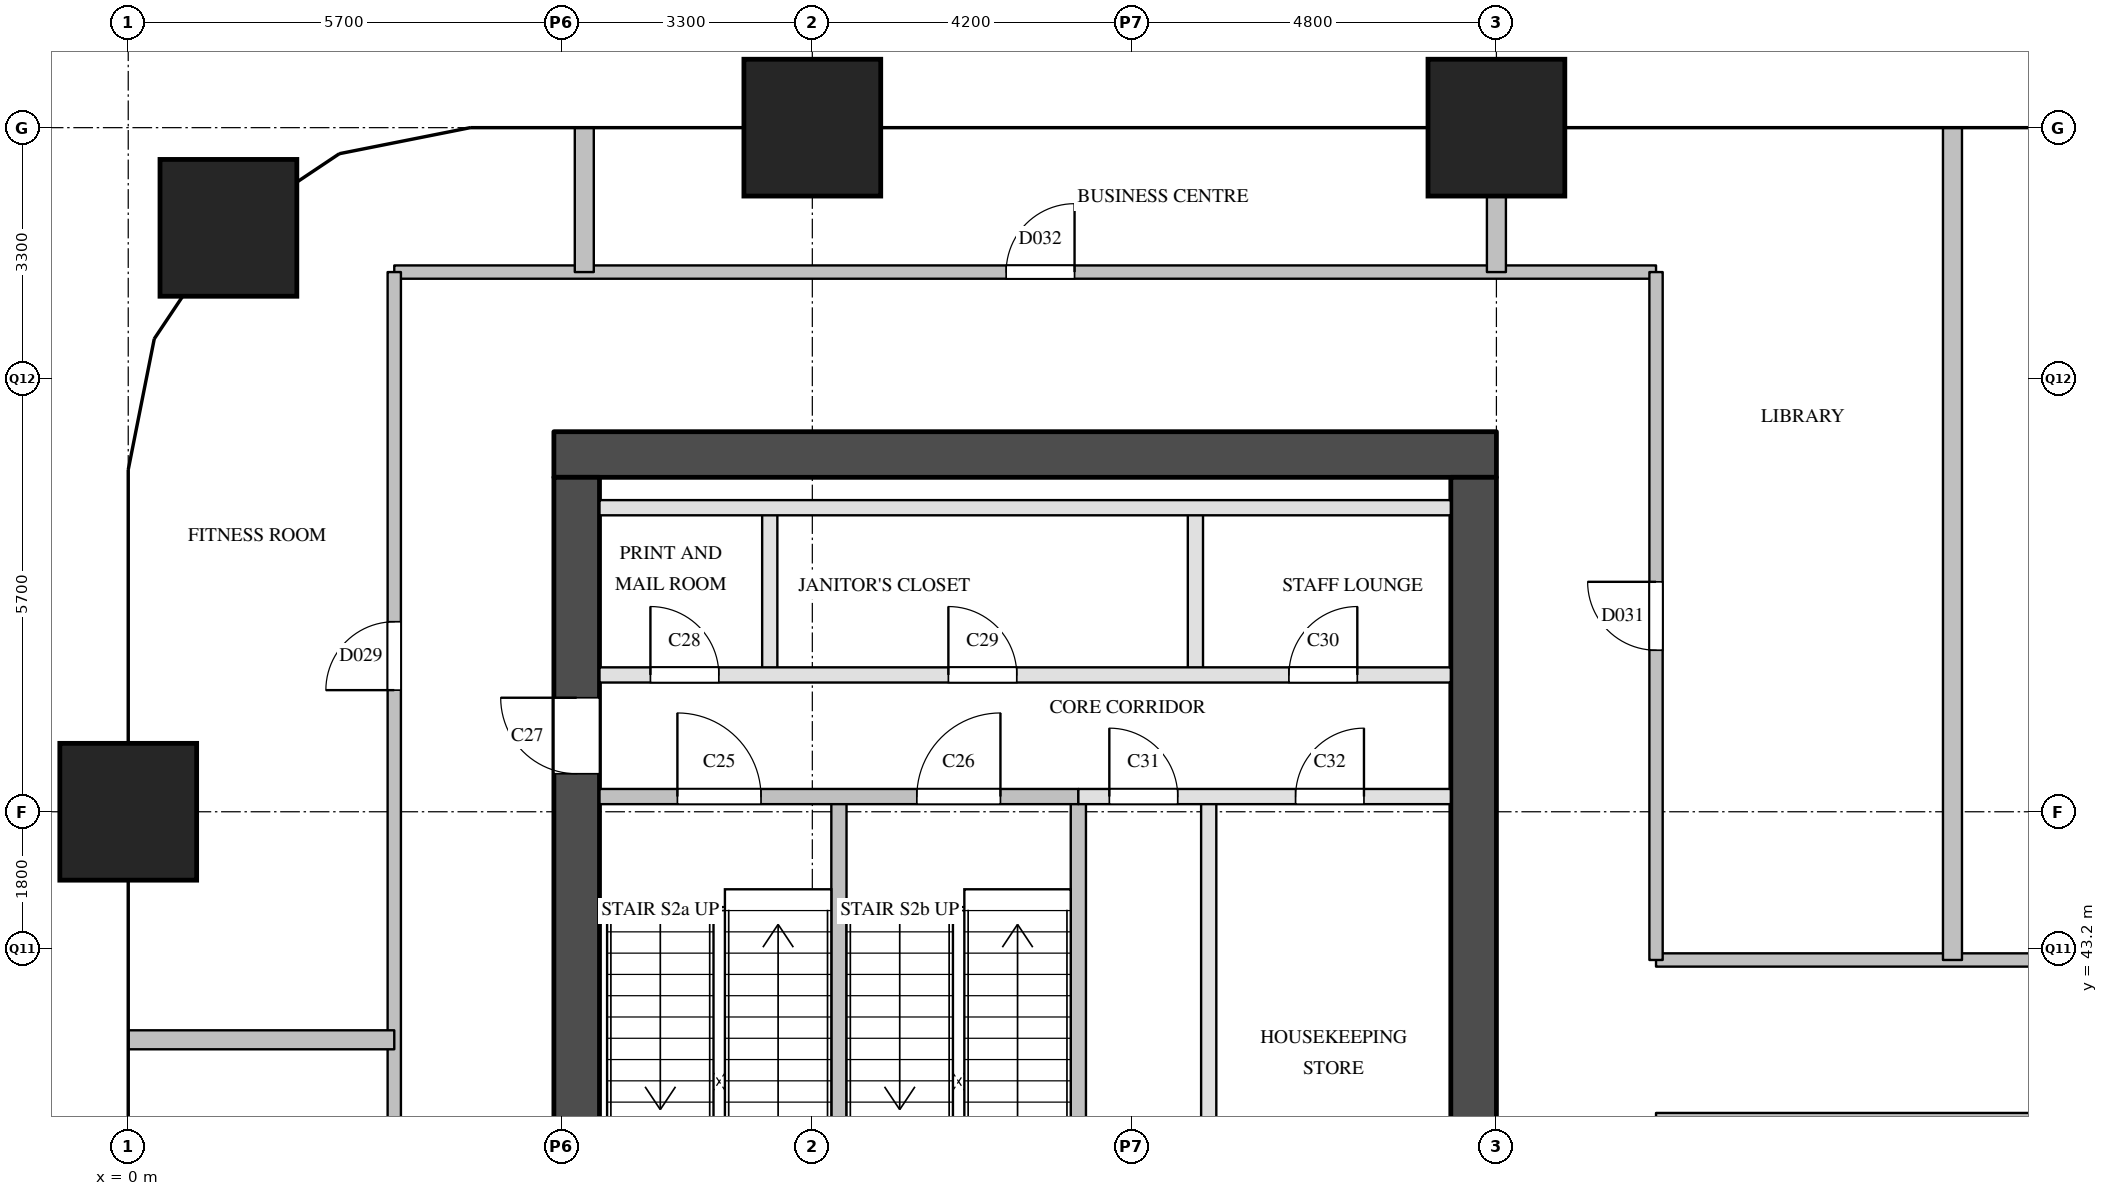
"""IFC4 building model, lengths in metres.
Left out: names, types, materials, properties, quantities, classifications, styles, units other than length and angle.
Written with IfcOpenShell. Run it as: python <this file> out.ifc"""

import sys

from ifc_helpers import new_model, si_unit, direction, frame, frame_2d, origin, origin_2d, place, context, subcontext, project, spatial, rectangle, extrude, element, fill, save


model = new_model("IFC4")
c1 = context("Model", 3, precision=1e-05, world=origin(), true_north=direction((0.0, 1.0)))
c2 = subcontext(c1, "Body", "Model", "MODEL_VIEW")
j1 = project(units=[si_unit("LENGTHUNIT", "METRE"), si_unit("PLANEANGLEUNIT", "RADIAN")], contexts=[c1])
p1 = place(None, origin())
s1 = spatial("IfcSite", under=j1, at=p1, CompositionType="ELEMENT")
p2 = place(p1, origin())
s2 = spatial("IfcBuilding", under=s1, at=p2, CompositionType="ELEMENT")
p3 = place(p2, frame((0.0, 0.0, 46.2)))
s3 = spatial("IfcBuildingStorey", under=s2, at=p3, CompositionType="ELEMENT", Elevation=46.2)
for number, where, z_axis, x_axis in (
    (1, (0.0, 45.0, 0.0), (0.0, 0.0, 1.0), (1.0, 0.0, 0.0)),
    (2, (1.318, 52.682, 0.0), (0.0, 0.0, 1.0), (1.0, 0.0, 0.0)),
    (3, (9.0, 54.0, 0.0), (0.0, 0.0, 1.0), (1.0, 0.0, 0.0)),
    (4, (18.0, 54.0, 0.0), (0.0, 0.0, 1.0), (1.0, 0.0, 0.0)),
):
    element("IfcColumn", number, at=place(p3, frame(where, z_axis=z_axis, x_axis=x_axis)), inside=s3, PredefinedType="COLUMN", context=c2, shape_type="SweptSolid", body=[
        extrude(rectangle(XDim=1.8, YDim=1.8, at=origin_2d()), origin(), (0.0, 0.0, 1.0), 3.8),
    ])
p4 = place(p3, frame((5.6, 49.7, 0.0), z_axis=(0.0, 0.0, 1.0), x_axis=(1.0, 0.0, 0.0)))
e5 = element("IfcWall", 5, at=p4, inside=s3, PredefinedType="SHEAR", context=c2, shape_type="SweptSolid", body=[
    extrude(rectangle(XDim=12.4, YDim=0.6, at=frame_2d((6.2, 0.0))), origin(), (0.0, 0.0, 1.0), 3.5),
])
p5 = place(p3, frame((5.9, 29.1, 0.0), z_axis=(0.0, 0.0, 1.0), x_axis=(0.0, 1.0, 0.0)))
e6 = element("IfcWall", 6, at=p5, inside=s3, PredefinedType="SHEAR", context=c2, shape_type="SweptSolid", body=[
    extrude(rectangle(XDim=20.3, YDim=0.6, at=frame_2d((10.15, 0.0))), origin(), (0.0, 0.0, 1.0), 3.5),
])
p6 = place(p5, frame((3.6, 0.0, 0.0)))
e7 = element("IfcOpeningElement", 7, at=p6, cuts=e6, PredefinedType="OPENING", context=c2, shape_type="SweptSolid", body=[
    extrude(rectangle(XDim=1.8, YDim=2.1, at=frame_2d((0.9, 1.05))), frame((0.0, 0.31, 0.0), z_axis=(0.0, -1.0, 0.0), x_axis=(1.0, 0.0, 0.0)), (0.0, 0.0, 1.0), 0.62),
])
p7 = place(p5, frame((16.4, 0.0, 0.0)))
e8 = element("IfcOpeningElement", 8, at=p7, cuts=e6, PredefinedType="OPENING", context=c2, shape_type="SweptSolid", body=[
    extrude(rectangle(XDim=1.0, YDim=2.1, at=frame_2d((0.5, 1.05))), frame((0.0, 0.31, 0.0), z_axis=(0.0, -1.0, 0.0), x_axis=(1.0, 0.0, 0.0)), (0.0, 0.0, 1.0), 0.62),
])
p8 = place(p3, frame((17.7, 29.1, 0.0), z_axis=(0.0, 0.0, 1.0), x_axis=(0.0, 1.0, 0.0)))
e9 = element("IfcWall", 9, at=p8, inside=s3, PredefinedType="SHEAR", context=c2, shape_type="SweptSolid", body=[
    extrude(rectangle(XDim=20.3, YDim=0.6, at=frame_2d((10.15, 0.0))), origin(), (0.0, 0.0, 1.0), 3.5),
])
p9 = place(p8, frame((1.25, 0.0, 0.0)))
e10 = element("IfcOpeningElement", 10, at=p9, cuts=e9, PredefinedType="OPENING", context=c2, shape_type="SweptSolid", body=[
    extrude(rectangle(XDim=0.7, YDim=2.1, at=frame_2d((0.35, 1.05))), frame((0.0, 0.31, 0.0), z_axis=(0.0, -1.0, 0.0), x_axis=(1.0, 0.0, 0.0)), (0.0, 0.0, 1.0), 0.62),
])
p10 = place(p8, frame((7.05, 0.0, 0.0)))
e11 = element("IfcOpeningElement", 11, at=p10, cuts=e9, PredefinedType="OPENING", context=c2, shape_type="SweptSolid", body=[
    extrude(rectangle(XDim=0.7, YDim=2.1, at=frame_2d((0.35, 1.05))), frame((0.0, 0.31, 0.0), z_axis=(0.0, -1.0, 0.0), x_axis=(1.0, 0.0, 0.0)), (0.0, 0.0, 1.0), 0.62),
])
p11 = place(p3, frame((8.44, 46.8, 0.0), z_axis=(0.0, 0.0, 1.0), x_axis=(0.0, 1.0, 0.0)))
e12 = element("IfcWall", 12, at=p11, inside=s3, PredefinedType="PARTITIONING", context=c2, shape_type="SweptSolid", body=[
    extrude(rectangle(XDim=2.2, YDim=0.2, at=frame_2d((1.1, 0.0))), origin(), (0.0, 0.0, 1.0), 3.5),
])
for number, where, z_axis, x_axis in (
    (13, (9.35, 40.9, 0.0), (0.0, 0.0, 1.0), (0.0, 1.0, 0.0)),
    (14, (12.5, 40.9, 0.0), (0.0, 0.0, 1.0), (0.0, 1.0, 0.0)),
):
    element("IfcWall", number, at=place(p3, frame(where, z_axis=z_axis, x_axis=x_axis)), inside=s3, PredefinedType="SOLIDWALL", context=c2, shape_type="SweptSolid", body=[
        extrude(rectangle(XDim=4.3, YDim=0.2, at=frame_2d((2.15, 0.0))), origin(), (0.0, 0.0, 1.0), 3.5),
    ])
p12 = place(p3, frame((14.04, 46.8, 0.0), z_axis=(0.0, 0.0, 1.0), x_axis=(0.0, 1.0, 0.0)))
e15 = element("IfcWall", 15, at=p12, inside=s3, PredefinedType="PARTITIONING", context=c2, shape_type="SweptSolid", body=[
    extrude(rectangle(XDim=2.2, YDim=0.2, at=frame_2d((1.1, 0.0))), origin(), (0.0, 0.0, 1.0), 3.5),
])
p13 = place(p3, frame((14.215, 39.0, 0.0), z_axis=(0.0, 0.0, 1.0), x_axis=(0.0, 1.0, 0.0)))
e16 = element("IfcWall", 16, at=p13, inside=s3, PredefinedType="PARTITIONING", context=c2, shape_type="SweptSolid", body=[
    extrude(rectangle(XDim=6.2, YDim=0.2, at=frame_2d((3.1, 0.0))), origin(), (0.0, 0.0, 1.0), 3.5),
])
p14 = place(p3, frame((12.5, 45.2, 0.0), z_axis=(0.0, 0.0, 1.0), x_axis=(1.0, 0.0, 0.0)))
e17 = element("IfcWall", 17, at=p14, inside=s3, PredefinedType="PARTITIONING", context=c2, shape_type="SweptSolid", body=[
    extrude(rectangle(XDim=4.9, YDim=0.2, at=frame_2d((2.45, 0.0))), origin(), (0.0, 0.0, 1.0), 3.5),
])
p15 = place(p14, frame((0.407, 0.0, 0.0)))
e18 = element("IfcOpeningElement", 18, at=p15, cuts=e17, PredefinedType="OPENING", context=c2, shape_type="SweptSolid", body=[
    extrude(rectangle(XDim=0.9, YDim=2.1, at=frame_2d((0.45, 1.05))), frame((0.0, 0.11, 0.0), z_axis=(0.0, -1.0, 0.0), x_axis=(1.0, 0.0, 0.0)), (0.0, 0.0, 1.0), 0.22),
])
p16 = place(p14, frame((2.857, 0.0, 0.0)))
e19 = element("IfcOpeningElement", 19, at=p16, cuts=e17, PredefinedType="OPENING", context=c2, shape_type="SweptSolid", body=[
    extrude(rectangle(XDim=0.9, YDim=2.1, at=frame_2d((0.45, 1.05))), frame((0.0, 0.11, 0.0), z_axis=(0.0, -1.0, 0.0), x_axis=(1.0, 0.0, 0.0)), (0.0, 0.0, 1.0), 0.22),
])
p17 = place(p3, frame((6.2, 45.2, 0.0), z_axis=(0.0, 0.0, 1.0), x_axis=(1.0, 0.0, 0.0)))
e20 = element("IfcWall", 20, at=p17, inside=s3, PredefinedType="SOLIDWALL", context=c2, shape_type="SweptSolid", body=[
    extrude(rectangle(XDim=6.3, YDim=0.2, at=frame_2d((3.15, 0.0))), origin(), (0.0, 0.0, 1.0), 3.5),
])
p18 = place(p17, frame((1.025, 0.0, 0.0)))
e21 = element("IfcOpeningElement", 21, at=p18, cuts=e20, PredefinedType="OPENING", context=c2, shape_type="SweptSolid", body=[
    extrude(rectangle(XDim=1.1, YDim=2.1, at=frame_2d((0.55, 1.05))), frame((0.0, 0.11, 0.0), z_axis=(0.0, -1.0, 0.0), x_axis=(1.0, 0.0, 0.0)), (0.0, 0.0, 1.0), 0.22),
])
p19 = place(p17, frame((4.175, 0.0, 0.0)))
e22 = element("IfcOpeningElement", 22, at=p19, cuts=e20, PredefinedType="OPENING", context=c2, shape_type="SweptSolid", body=[
    extrude(rectangle(XDim=1.1, YDim=2.1, at=frame_2d((0.55, 1.05))), frame((0.0, 0.11, 0.0), z_axis=(0.0, -1.0, 0.0), x_axis=(1.0, 0.0, 0.0)), (0.0, 0.0, 1.0), 0.22),
])
p20 = place(p3, frame((6.2, 46.8, 0.0), z_axis=(0.0, 0.0, 1.0), x_axis=(1.0, 0.0, 0.0)))
e23 = element("IfcWall", 23, at=p20, inside=s3, PredefinedType="PARTITIONING", context=c2, shape_type="SweptSolid", body=[
    extrude(rectangle(XDim=11.2, YDim=0.2, at=frame_2d((5.6, 0.0))), origin(), (0.0, 0.0, 1.0), 3.5),
])
p21 = place(p20, frame((0.67, 0.0, 0.0)))
e24 = element("IfcOpeningElement", 24, at=p21, cuts=e23, PredefinedType="OPENING", context=c2, shape_type="SweptSolid", body=[
    extrude(rectangle(XDim=0.9, YDim=2.1, at=frame_2d((0.45, 1.05))), frame((0.0, 0.11, 0.0), z_axis=(0.0, -1.0, 0.0), x_axis=(1.0, 0.0, 0.0)), (0.0, 0.0, 1.0), 0.22),
])
p22 = place(p20, frame((4.59, 0.0, 0.0)))
e25 = element("IfcOpeningElement", 25, at=p22, cuts=e23, PredefinedType="OPENING", context=c2, shape_type="SweptSolid", body=[
    extrude(rectangle(XDim=0.9, YDim=2.1, at=frame_2d((0.45, 1.05))), frame((0.0, 0.11, 0.0), z_axis=(0.0, -1.0, 0.0), x_axis=(1.0, 0.0, 0.0)), (0.0, 0.0, 1.0), 0.22),
])
p23 = place(p20, frame((9.07, 0.0, 0.0)))
e26 = element("IfcOpeningElement", 26, at=p23, cuts=e23, PredefinedType="OPENING", context=c2, shape_type="SweptSolid", body=[
    extrude(rectangle(XDim=0.9, YDim=2.1, at=frame_2d((0.45, 1.05))), frame((0.0, 0.11, 0.0), z_axis=(0.0, -1.0, 0.0), x_axis=(1.0, 0.0, 0.0)), (0.0, 0.0, 1.0), 0.22),
])
p24 = place(p3, frame((6.2, 49.0, 0.0), z_axis=(0.0, 0.0, 1.0), x_axis=(1.0, 0.0, 0.0)))
e27 = element("IfcWall", 27, at=p24, inside=s3, PredefinedType="PARTITIONING", context=c2, shape_type="SweptSolid", body=[
    extrude(rectangle(XDim=11.2, YDim=0.2, at=frame_2d((5.6, 0.0))), origin(), (0.0, 0.0, 1.0), 3.5),
])
p25 = place(p3, frame((20.1, 40.95, 0.0), z_axis=(0.0, 0.0, 1.0), x_axis=(1.0, 0.0, 0.0)))
e28 = element("IfcWall", 28, at=p25, inside=s3, PredefinedType="PARTITIONING", context=c2, shape_type="SweptSolid", body=[
    extrude(rectangle(XDim=13.8, YDim=0.175, at=frame_2d((6.9, 0.0))), origin(), (0.0, 0.0, 1.0), 2.5),
])
p26 = place(p25, frame((8.4, 0.0, 0.0)))
e29 = element("IfcOpeningElement", 29, at=p26, cuts=e28, PredefinedType="OPENING", context=c2, shape_type="SweptSolid", body=[
    extrude(rectangle(XDim=0.9, YDim=2.1, at=frame_2d((0.45, 1.05))), frame((0.0, 0.097, 0.0), z_axis=(0.0, -1.0, 0.0), x_axis=(1.0, 0.0, 0.0)), (0.0, 0.0, 1.0), 0.195),
])
p27 = place(p3, frame((20.1, 43.05, 0.0), z_axis=(0.0, 0.0, 1.0), x_axis=(1.0, 0.0, 0.0)))
e30 = element("IfcWall", 30, at=p27, inside=s3, PredefinedType="PARTITIONING", context=c2, shape_type="SweptSolid", body=[
    extrude(rectangle(XDim=13.8, YDim=0.175, at=frame_2d((6.9, 0.0))), origin(), (0.0, 0.0, 1.0), 2.5),
])
p28 = place(p27, frame((8.4, 0.0, 0.0)))
e31 = element("IfcOpeningElement", 31, at=p28, cuts=e30, PredefinedType="OPENING", context=c2, shape_type="SweptSolid", body=[
    extrude(rectangle(XDim=0.9, YDim=2.1, at=frame_2d((0.45, 1.05))), frame((0.0, 0.097, 0.0), z_axis=(0.0, -1.0, 0.0), x_axis=(1.0, 0.0, 0.0)), (0.0, 0.0, 1.0), 0.195),
])
p29 = place(p3, frame((3.5, 52.1, 0.0), z_axis=(0.0, 0.0, 1.0), x_axis=(1.0, 0.0, 0.0)))
e32 = element("IfcWall", 32, at=p29, inside=s3, PredefinedType="PARTITIONING", context=c2, shape_type="SweptSolid", body=[
    extrude(rectangle(XDim=16.6, YDim=0.175, at=frame_2d((8.3, 0.0))), origin(), (0.0, 0.0, 1.0), 3.5),
])
p30 = place(p29, frame((8.05, 0.0, 0.0)))
e33 = element("IfcOpeningElement", 33, at=p30, cuts=e32, PredefinedType="OPENING", context=c2, shape_type="SweptSolid", body=[
    extrude(rectangle(XDim=0.9, YDim=2.1, at=frame_2d((0.45, 1.05))), frame((0.0, 0.097, 0.0), z_axis=(0.0, -1.0, 0.0), x_axis=(1.0, 0.0, 0.0)), (0.0, 0.0, 1.0), 0.195),
])
p31 = place(p3, frame((3.5, 26.4, 0.0), z_axis=(0.0, 0.0, 1.0), x_axis=(0.0, 1.0, 0.0)))
e34 = element("IfcWall", 34, at=p31, inside=s3, PredefinedType="PARTITIONING", context=c2, shape_type="SweptSolid", body=[
    extrude(rectangle(XDim=25.7, YDim=0.175, at=frame_2d((12.85, 0.0))), origin(), (0.0, 0.0, 1.0), 2.5),
])
p32 = place(p31, frame((4.35, 0.0, 0.0)))
e35 = element("IfcOpeningElement", 35, at=p32, cuts=e34, PredefinedType="OPENING", context=c2, shape_type="SweptSolid", body=[
    extrude(rectangle(XDim=0.9, YDim=2.1, at=frame_2d((0.45, 1.05))), frame((0.0, 0.097, 0.0), z_axis=(0.0, -1.0, 0.0), x_axis=(1.0, 0.0, 0.0)), (0.0, 0.0, 1.0), 0.195),
])
p33 = place(p31, frame((12.15, 0.0, 0.0)))
e36 = element("IfcOpeningElement", 36, at=p33, cuts=e34, PredefinedType="OPENING", context=c2, shape_type="SweptSolid", body=[
    extrude(rectangle(XDim=0.9, YDim=2.1, at=frame_2d((0.45, 1.05))), frame((0.0, 0.097, 0.0), z_axis=(0.0, -1.0, 0.0), x_axis=(1.0, 0.0, 0.0)), (0.0, 0.0, 1.0), 0.195),
])
p34 = place(p31, frame((20.2, 0.0, 0.0)))
e37 = element("IfcOpeningElement", 37, at=p34, cuts=e34, PredefinedType="OPENING", context=c2, shape_type="SweptSolid", body=[
    extrude(rectangle(XDim=0.9, YDim=2.1, at=frame_2d((0.45, 1.05))), frame((0.0, 0.097, 0.0), z_axis=(0.0, -1.0, 0.0), x_axis=(1.0, 0.0, 0.0)), (0.0, 0.0, 1.0), 0.195),
])
p35 = place(p3, frame((20.1, 43.05, 0.0), z_axis=(0.0, 0.0, 1.0), x_axis=(0.0, 1.0, 0.0)))
e38 = element("IfcWall", 38, at=p35, inside=s3, PredefinedType="PARTITIONING", context=c2, shape_type="SweptSolid", body=[
    extrude(rectangle(XDim=9.05, YDim=0.175, at=frame_2d((4.525, 0.0))), origin(), (0.0, 0.0, 1.0), 3.5),
])
p36 = place(p35, frame((4.075, 0.0, 0.0)))
e39 = element("IfcOpeningElement", 39, at=p36, cuts=e38, PredefinedType="OPENING", context=c2, shape_type="SweptSolid", body=[
    extrude(rectangle(XDim=0.9, YDim=2.1, at=frame_2d((0.45, 1.05))), frame((0.0, 0.097, 0.0), z_axis=(0.0, -1.0, 0.0), x_axis=(1.0, 0.0, 0.0)), (0.0, 0.0, 1.0), 0.195),
])
p37 = place(p3, frame((0.0, 42.0, 0.0), z_axis=(0.0, 0.0, 1.0), x_axis=(1.0, 0.0, 0.0)))
e40 = element("IfcWall", 40, at=p37, inside=s3, PredefinedType="PARTITIONING", context=c2, shape_type="SweptSolid", body=[
    extrude(rectangle(XDim=3.5, YDim=0.25, at=frame_2d((1.75, 0.0))), origin(), (0.0, 0.0, 1.0), 2.5),
])
p38 = place(p3, frame((6.0, 52.1, 0.0), z_axis=(0.0, 0.0, 1.0), x_axis=(0.0, 1.0, 0.0)))
e41 = element("IfcWall", 41, at=p38, inside=s3, PredefinedType="PARTITIONING", context=c2, shape_type="SweptSolid", body=[
    extrude(rectangle(XDim=1.9, YDim=0.25, at=frame_2d((0.95, 0.0))), origin(), (0.0, 0.0, 1.0), 2.5),
])
p39 = place(p3, frame((18.0, 52.1, 0.0), z_axis=(0.0, 0.0, 1.0), x_axis=(0.0, 1.0, 0.0)))
e42 = element("IfcWall", 42, at=p39, inside=s3, PredefinedType="PARTITIONING", context=c2, shape_type="SweptSolid", body=[
    extrude(rectangle(XDim=1.9, YDim=0.25, at=frame_2d((0.95, 0.0))), origin(), (0.0, 0.0, 1.0), 3.5),
])
p40 = place(p3, frame((24.0, 43.05, 0.0), z_axis=(0.0, 0.0, 1.0), x_axis=(0.0, 1.0, 0.0)))
e43 = element("IfcWall", 43, at=p40, inside=s3, PredefinedType="PARTITIONING", context=c2, shape_type="SweptSolid", body=[
    extrude(rectangle(XDim=10.95, YDim=0.25, at=frame_2d((5.475, 0.0))), origin(), (0.0, 0.0, 1.0), 2.5),
])
p41 = place(p18, origin())
e44 = element("IfcDoor", 44, at=p41, inside=s3, OperationType="SINGLE_SWING_LEFT", PredefinedType="DOOR", context=c2, shape_type="SweptSolid", body=[
    extrude(rectangle(XDim=1.1, YDim=2.1, at=frame_2d((0.55, 1.05))), frame((0.0, 0.025, 0.0), z_axis=(0.0, -1.0, 0.0), x_axis=(1.0, 0.0, 0.0)), (0.0, 0.0, 1.0), 0.05),
])
fill(e21, e44)
p42 = place(p19, origin())
e45 = element("IfcDoor", 45, at=p42, inside=s3, OperationType="SINGLE_SWING_RIGHT", PredefinedType="DOOR", context=c2, shape_type="SweptSolid", body=[
    extrude(rectangle(XDim=1.1, YDim=2.1, at=frame_2d((0.55, 1.05))), frame((0.0, 0.025, 0.0), z_axis=(0.0, -1.0, 0.0), x_axis=(1.0, 0.0, 0.0)), (0.0, 0.0, 1.0), 0.05),
])
fill(e22, e45)
p43 = place(p7, origin())
e46 = element("IfcDoor", 46, at=p43, inside=s3, OperationType="SINGLE_SWING_RIGHT", PredefinedType="DOOR", context=c2, shape_type="SweptSolid", body=[
    extrude(rectangle(XDim=1.0, YDim=2.1, at=frame_2d((0.5, 1.05))), frame((0.0, 0.025, 0.0), z_axis=(0.0, -1.0, 0.0), x_axis=(1.0, 0.0, 0.0)), (0.0, 0.0, 1.0), 0.05),
])
fill(e8, e46)
p44 = place(p21, origin())
e47 = element("IfcDoor", 47, at=p44, inside=s3, OperationType="SINGLE_SWING_LEFT", PredefinedType="DOOR", context=c2, shape_type="SweptSolid", body=[
    extrude(rectangle(XDim=0.9, YDim=2.1, at=frame_2d((0.45, 1.05))), frame((0.0, 0.025, 0.0), z_axis=(0.0, -1.0, 0.0), x_axis=(1.0, 0.0, 0.0)), (0.0, 0.0, 1.0), 0.05),
])
fill(e24, e47)
p45 = place(p22, origin())
e48 = element("IfcDoor", 48, at=p45, inside=s3, OperationType="SINGLE_SWING_LEFT", PredefinedType="DOOR", context=c2, shape_type="SweptSolid", body=[
    extrude(rectangle(XDim=0.9, YDim=2.1, at=frame_2d((0.45, 1.05))), frame((0.0, 0.025, 0.0), z_axis=(0.0, -1.0, 0.0), x_axis=(1.0, 0.0, 0.0)), (0.0, 0.0, 1.0), 0.05),
])
fill(e25, e48)
p46 = place(p23, origin())
e49 = element("IfcDoor", 49, at=p46, inside=s3, OperationType="SINGLE_SWING_RIGHT", PredefinedType="DOOR", context=c2, shape_type="SweptSolid", body=[
    extrude(rectangle(XDim=0.9, YDim=2.1, at=frame_2d((0.45, 1.05))), frame((0.0, 0.025, 0.0), z_axis=(0.0, -1.0, 0.0), x_axis=(1.0, 0.0, 0.0)), (0.0, 0.0, 1.0), 0.05),
])
fill(e26, e49)
p47 = place(p15, origin())
e50 = element("IfcDoor", 50, at=p47, inside=s3, OperationType="SINGLE_SWING_LEFT", PredefinedType="DOOR", context=c2, shape_type="SweptSolid", body=[
    extrude(rectangle(XDim=0.9, YDim=2.1, at=frame_2d((0.45, 1.05))), frame((0.0, 0.025, 0.0), z_axis=(0.0, -1.0, 0.0), x_axis=(1.0, 0.0, 0.0)), (0.0, 0.0, 1.0), 0.05),
])
fill(e18, e50)
p48 = place(p16, origin())
e51 = element("IfcDoor", 51, at=p48, inside=s3, OperationType="SINGLE_SWING_RIGHT", PredefinedType="DOOR", context=c2, shape_type="SweptSolid", body=[
    extrude(rectangle(XDim=0.9, YDim=2.1, at=frame_2d((0.45, 1.05))), frame((0.0, 0.025, 0.0), z_axis=(0.0, -1.0, 0.0), x_axis=(1.0, 0.0, 0.0)), (0.0, 0.0, 1.0), 0.05),
])
fill(e19, e51)
p49 = place(p34, origin())
e52 = element("IfcDoor", 52, at=p49, inside=s3, OperationType="SINGLE_SWING_LEFT", PredefinedType="DOOR", context=c2, shape_type="SweptSolid", body=[
    extrude(rectangle(XDim=0.9, YDim=2.1, at=frame_2d((0.45, 1.05))), frame((0.0, 0.025, 0.0), z_axis=(0.0, -1.0, 0.0), x_axis=(1.0, 0.0, 0.0)), (0.0, 0.0, 1.0), 0.05),
])
fill(e37, e52)
p50 = place(p36, origin())
e53 = element("IfcDoor", 53, at=p50, inside=s3, OperationType="SINGLE_SWING_RIGHT", PredefinedType="DOOR", context=c2, shape_type="SweptSolid", body=[
    extrude(rectangle(XDim=0.9, YDim=2.1, at=frame_2d((0.45, 1.05))), frame((0.0, 0.025, 0.0), z_axis=(0.0, -1.0, 0.0), x_axis=(1.0, 0.0, 0.0)), (0.0, 0.0, 1.0), 0.05),
])
fill(e39, e53)
p51 = place(p30, origin())
e54 = element("IfcDoor", 54, at=p51, inside=s3, OperationType="SINGLE_SWING_RIGHT", PredefinedType="DOOR", context=c2, shape_type="SweptSolid", body=[
    extrude(rectangle(XDim=0.9, YDim=2.1, at=frame_2d((0.45, 1.05))), frame((0.0, 0.025, 0.0), z_axis=(0.0, -1.0, 0.0), x_axis=(1.0, 0.0, 0.0)), (0.0, 0.0, 1.0), 0.05),
])
fill(e33, e54)
save(model, sys.argv[1])
